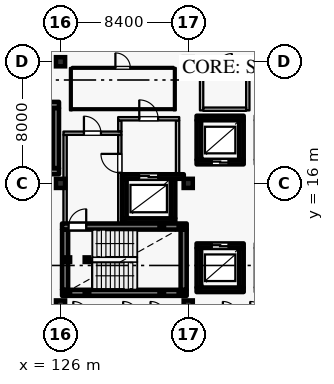
"""IFC4 building model, lengths in metres.
Left out: names, types, materials, properties, quantities, classifications, styles, units other than length and angle.
Written with IfcOpenShell. Run it as: python <this file> out.ifc"""

import sys

from ifc_helpers import new_model, si_unit, direction, frame, frame_2d, origin, origin_2d, place, context, subcontext, project, spatial, rectangle, hollow_rectangle, extrude, element, fill, save


model = new_model("IFC4")
c1 = context("Model", 3, precision=1e-05, world=origin(), true_north=direction((0.0, 1.0)))
c2 = subcontext(c1, "Body", "Model", "MODEL_VIEW")
j1 = project(units=[si_unit("LENGTHUNIT", "METRE"), si_unit("PLANEANGLEUNIT", "RADIAN")], contexts=[c1])
p1 = place(None, origin())
s1 = spatial("IfcSite", under=j1, at=p1, CompositionType="ELEMENT")
p2 = place(p1, origin())
s2 = spatial("IfcBuilding", under=s1, at=p2, CompositionType="ELEMENT")
p3 = place(p2, frame((0.0, 0.0, 39.6)))
s3 = spatial("IfcBuildingStorey", under=s2, at=p3, CompositionType="ELEMENT", Elevation=39.6)
for number, where, z_axis, x_axis in (
    (1, (126.0, 16.0, 0.0), (0.0, 0.0, 1.0), (1.0, 0.0, 0.0)),
    (2, (134.4, 16.0, 0.0), (0.0, 0.0, 1.0), (1.0, 0.0, 0.0)),
    (3, (126.0, 8.0, 0.0), (0.0, 0.0, 1.0), (1.0, 0.0, 0.0)),
    (4, (126.0, 24.0, 0.0), (0.0, 0.0, 1.0), (1.0, 0.0, 0.0)),
    (5, (134.4, 8.0, 0.0), (0.0, 0.0, 1.0), (1.0, 0.0, 0.0)),
    (6, (134.4, 24.0, 0.0), (0.0, 0.0, 1.0), (1.0, 0.0, 0.0)),
):
    element("IfcColumn", number, at=place(p3, frame(where, z_axis=z_axis, x_axis=x_axis)), inside=s3, PredefinedType="COLUMN", context=c2, shape_type="SweptSolid", body=[
        extrude(rectangle(XDim=0.6, YDim=0.6, at=origin_2d()), origin(), (0.0, 0.0, 1.0), 3.6),
    ])
p4 = place(p3, frame((134.95, 17.4, 0.0), z_axis=(0.0, 0.0, 1.0), x_axis=(1.0, 0.0, 0.0)))
e7 = element("IfcWall", 7, at=p4, inside=s3, PredefinedType="SHEAR", context=c2, shape_type="SweptSolid", body=[
    extrude(rectangle(XDim=3.1, YDim=0.3, at=frame_2d((1.55, 0.0))), origin(), (0.0, 0.0, 1.0), 3.335),
])
p5 = place(p4, frame((1.0, 0.0, 0.0)))
e8 = element("IfcOpeningElement", 8, at=p5, cuts=e7, PredefinedType="OPENING", context=c2, shape_type="SweptSolid", body=[
    extrude(rectangle(XDim=1.1, YDim=2.2, at=frame_2d((0.55, 1.1))), frame((0.0, 0.16, 0.0), z_axis=(0.0, -1.0, 0.0), x_axis=(1.0, 0.0, 0.0)), (0.0, 0.0, 1.0), 0.32),
])
p6 = place(p3, frame((137.9, 17.555, 0.0), z_axis=(0.0, 0.0, 1.0), x_axis=(0.0, 1.0, 0.0)))
e9 = element("IfcWall", 9, at=p6, inside=s3, PredefinedType="SHEAR", context=c2, shape_type="SweptSolid", body=[
    extrude(rectangle(XDim=2.59, YDim=0.3, at=frame_2d((1.295, 0.0))), origin(), (0.0, 0.0, 1.0), 3.335),
])
p7 = place(p3, frame((138.05, 20.3, 0.0), z_axis=(0.0, 0.0, 1.0), x_axis=(-1.0, 0.0, 0.0)))
e10 = element("IfcWall", 10, at=p7, inside=s3, PredefinedType="SHEAR", context=c2, shape_type="SweptSolid", body=[
    extrude(rectangle(XDim=3.1, YDim=0.3, at=frame_2d((1.55, 0.0))), origin(), (0.0, 0.0, 1.0), 3.335),
])
p8 = place(p3, frame((135.1, 20.145, 0.0), z_axis=(0.0, 0.0, 1.0), x_axis=(0.0, -1.0, 0.0)))
e11 = element("IfcWall", 11, at=p8, inside=s3, PredefinedType="SHEAR", context=c2, shape_type="SweptSolid", body=[
    extrude(rectangle(XDim=2.59, YDim=0.3, at=frame_2d((1.295, 0.0))), origin(), (0.0, 0.0, 1.0), 3.335),
])
p9 = place(p3, frame((134.95, 9.0, 0.0), z_axis=(0.0, 0.0, 1.0), x_axis=(1.0, 0.0, 0.0)))
e12 = element("IfcWall", 12, at=p9, inside=s3, PredefinedType="SHEAR", context=c2, shape_type="SweptSolid", body=[
    extrude(rectangle(XDim=3.1, YDim=0.3, at=frame_2d((1.55, 0.0))), origin(), (0.0, 0.0, 1.0), 3.335),
])
p10 = place(p3, frame((137.9, 9.155, 0.0), z_axis=(0.0, 0.0, 1.0), x_axis=(0.0, 1.0, 0.0)))
e13 = element("IfcWall", 13, at=p10, inside=s3, PredefinedType="SHEAR", context=c2, shape_type="SweptSolid", body=[
    extrude(rectangle(XDim=2.59, YDim=0.3, at=frame_2d((1.295, 0.0))), origin(), (0.0, 0.0, 1.0), 3.335),
])
p11 = place(p3, frame((138.05, 11.9, 0.0), z_axis=(0.0, 0.0, 1.0), x_axis=(-1.0, 0.0, 0.0)))
e14 = element("IfcWall", 14, at=p11, inside=s3, PredefinedType="SHEAR", context=c2, shape_type="SweptSolid", body=[
    extrude(rectangle(XDim=3.1, YDim=0.3, at=frame_2d((1.55, 0.0))), origin(), (0.0, 0.0, 1.0), 3.335),
])
p12 = place(p11, frame((1.0, 0.0, 0.0)))
e15 = element("IfcOpeningElement", 15, at=p12, cuts=e14, PredefinedType="OPENING", context=c2, shape_type="SweptSolid", body=[
    extrude(rectangle(XDim=1.1, YDim=2.2, at=frame_2d((0.55, 1.1))), frame((0.0, 0.16, 0.0), z_axis=(0.0, -1.0, 0.0), x_axis=(1.0, 0.0, 0.0)), (0.0, 0.0, 1.0), 0.32),
])
p13 = place(p3, frame((135.1, 11.745, 0.0), z_axis=(0.0, 0.0, 1.0), x_axis=(0.0, -1.0, 0.0)))
e16 = element("IfcWall", 16, at=p13, inside=s3, PredefinedType="SHEAR", context=c2, shape_type="SweptSolid", body=[
    extrude(rectangle(XDim=2.59, YDim=0.3, at=frame_2d((1.295, 0.0))), origin(), (0.0, 0.0, 1.0), 3.335),
])
p14 = place(p3, frame((130.05, 13.55, 0.0), z_axis=(0.0, 0.0, 1.0), x_axis=(1.0, 0.0, 0.0)))
e17 = element("IfcWall", 17, at=p14, inside=s3, PredefinedType="SHEAR", context=c2, shape_type="SweptSolid", body=[
    extrude(rectangle(XDim=3.5, YDim=0.3, at=frame_2d((1.75, 0.0))), origin(), (0.0, 0.0, 1.0), 3.335),
])
p15 = place(p3, frame((133.4, 13.705, 0.0), z_axis=(0.0, 0.0, 1.0), x_axis=(0.0, 1.0, 0.0)))
e18 = element("IfcWall", 18, at=p15, inside=s3, PredefinedType="SHEAR", context=c2, shape_type="SweptSolid", body=[
    extrude(rectangle(XDim=2.59, YDim=0.3, at=frame_2d((1.295, 0.0))), origin(), (0.0, 0.0, 1.0), 3.335),
])
p16 = place(p3, frame((134.11, 16.45, 0.0), z_axis=(0.0, 0.0, 1.0), x_axis=(-1.0, 0.0, 0.0)))
e19 = element("IfcWall", 19, at=p16, inside=s3, PredefinedType="SHEAR", context=c2, shape_type="SweptSolid", body=[
    extrude(rectangle(XDim=4.06, YDim=0.3, at=frame_2d((2.03, 0.0))), origin(), (0.0, 0.0, 1.0), 3.335),
])
p17 = place(p16, frame((1.685, 0.0, 0.0)))
e20 = element("IfcOpeningElement", 20, at=p17, cuts=e19, PredefinedType="OPENING", context=c2, shape_type="SweptSolid", body=[
    extrude(rectangle(XDim=1.25, YDim=2.25, at=frame_2d((0.625, 1.125))), frame((0.0, 0.16, 0.0), z_axis=(0.0, -1.0, 0.0), x_axis=(1.0, 0.0, 0.0)), (0.0, 0.0, 1.0), 0.32),
])
p18 = place(p3, frame((130.2, 16.295, 0.0), z_axis=(0.0, 0.0, 1.0), x_axis=(0.0, -1.0, 0.0)))
e21 = element("IfcWall", 21, at=p18, inside=s3, PredefinedType="SHEAR", context=c2, shape_type="SweptSolid", body=[
    extrude(rectangle(XDim=2.59, YDim=0.3, at=frame_2d((1.295, 0.0))), origin(), (0.0, 0.0, 1.0), 3.335),
])
p19 = place(p3, frame((126.1, 8.8, 0.0), z_axis=(0.0, 0.0, 1.0), x_axis=(1.0, 0.0, 0.0)))
e22 = element("IfcWall", 22, at=p19, inside=s3, PredefinedType="SHEAR", context=c2, shape_type="SweptSolid", body=[
    extrude(rectangle(XDim=8.2, YDim=0.4, at=frame_2d((4.1, 0.0))), origin(), (0.0, 0.0, 1.0), 3.335),
])
p20 = place(p3, frame((134.1, 9.005, 0.0), z_axis=(0.0, 0.0, 1.0), x_axis=(0.0, 1.0, 0.0)))
e23 = element("IfcWall", 23, at=p20, inside=s3, PredefinedType="SHEAR", context=c2, shape_type="SweptSolid", body=[
    extrude(rectangle(XDim=3.95, YDim=0.4, at=frame_2d((1.975, 0.0))), origin(), (0.0, 0.0, 1.0), 3.335),
])
p21 = place(p3, frame((126.1, 13.16, 0.0), z_axis=(0.0, 0.0, 1.0), x_axis=(1.0, 0.0, 0.0)))
e24 = element("IfcWall", 24, at=p21, inside=s3, PredefinedType="SHEAR", context=c2, shape_type="SweptSolid", body=[
    extrude(rectangle(XDim=8.2, YDim=0.4, at=frame_2d((4.1, 0.0))), origin(), (0.0, 0.0, 1.0), 3.335),
])
p22 = place(p21, frame((0.43, 0.0, 0.0)))
e25 = element("IfcOpeningElement", 25, at=p22, cuts=e24, PredefinedType="OPENING", context=c2, shape_type="SweptSolid", body=[
    extrude(rectangle(XDim=1.16, YDim=2.2, at=frame_2d((0.58, 1.1))), frame((0.0, 0.21, 0.0), z_axis=(0.0, -1.0, 0.0), x_axis=(1.0, 0.0, 0.0)), (0.0, 0.0, 1.0), 0.42),
])
p23 = place(p3, frame((126.3, 9.005, 0.0), z_axis=(0.0, 0.0, 1.0), x_axis=(0.0, 1.0, 0.0)))
e26 = element("IfcWall", 26, at=p23, inside=s3, PredefinedType="SHEAR", context=c2, shape_type="SweptSolid", body=[
    extrude(rectangle(XDim=3.95, YDim=0.4, at=frame_2d((1.975, 0.0))), origin(), (0.0, 0.0, 1.0), 3.335),
])
p24 = place(p3, frame((126.3, 13.365, 0.0), z_axis=(0.0, 0.0, 1.0), x_axis=(0.0, 1.0, 0.0)))
e27 = element("IfcWall", 27, at=p24, inside=s3, PredefinedType="PARTITIONING", context=c2, shape_type="SweptSolid", body=[
    extrude(rectangle(XDim=5.82, YDim=0.22, at=frame_2d((2.91, 0.0))), origin(), (0.0, 0.0, 1.0), 3.335),
])
p25 = place(p3, frame((126.19, 19.3, 0.0), z_axis=(0.0, 0.0, 1.0), x_axis=(1.0, 0.0, 0.0)))
e28 = element("IfcWall", 28, at=p25, inside=s3, PredefinedType="PARTITIONING", context=c2, shape_type="SweptSolid", body=[
    extrude(rectangle(XDim=3.82, YDim=0.22, at=frame_2d((1.91, 0.0))), origin(), (0.0, 0.0, 1.0), 3.335),
])
p26 = place(p25, frame((1.35, 0.0, 0.0)))
e29 = element("IfcOpeningElement", 29, at=p26, cuts=e28, PredefinedType="OPENING", context=c2, shape_type="SweptSolid", body=[
    extrude(rectangle(XDim=1.12, YDim=2.2, at=frame_2d((0.56, 1.1))), frame((0.0, 0.12, 0.0), z_axis=(0.0, -1.0, 0.0), x_axis=(1.0, 0.0, 0.0)), (0.0, 0.0, 1.0), 0.24),
])
p27 = place(p3, frame((129.9, 13.365, 0.0), z_axis=(0.0, 0.0, 1.0), x_axis=(0.0, 1.0, 0.0)))
e30 = element("IfcWall", 30, at=p27, inside=s3, PredefinedType="PARTITIONING", context=c2, shape_type="SweptSolid", body=[
    extrude(rectangle(XDim=5.82, YDim=0.22, at=frame_2d((2.91, 0.0))), origin(), (0.0, 0.0, 1.0), 3.335),
])
p28 = place(p27, frame((3.335, 0.0, 0.0)))
e31 = element("IfcOpeningElement", 31, at=p28, cuts=e30, PredefinedType="OPENING", context=c2, shape_type="SweptSolid", body=[
    extrude(rectangle(XDim=1.24, YDim=2.2, at=frame_2d((0.62, 1.1))), frame((0.0, 0.12, 0.0), z_axis=(0.0, -1.0, 0.0), x_axis=(1.0, 0.0, 0.0)), (0.0, 0.0, 1.0), 0.24),
])
p29 = place(p3, frame((129.9, 19.415, 0.0), z_axis=(0.0, 0.0, 1.0), x_axis=(0.0, 1.0, 0.0)))
e32 = element("IfcWall", 32, at=p29, inside=s3, PredefinedType="PARTITIONING", context=c2, shape_type="SweptSolid", body=[
    extrude(rectangle(XDim=0.72, YDim=0.22, at=frame_2d((0.36, 0.0))), origin(), (0.0, 0.0, 1.0), 3.335),
])
p30 = place(p3, frame((133.7, 16.605, 0.0), z_axis=(0.0, 0.0, 1.0), x_axis=(0.0, 1.0, 0.0)))
e33 = element("IfcWall", 33, at=p30, inside=s3, PredefinedType="PARTITIONING", context=c2, shape_type="SweptSolid", body=[
    extrude(rectangle(XDim=3.53, YDim=0.22, at=frame_2d((1.765, 0.0))), origin(), (0.0, 0.0, 1.0), 3.335),
])
p31 = place(p3, frame((129.79, 20.25, 0.0), z_axis=(0.0, 0.0, 1.0), x_axis=(1.0, 0.0, 0.0)))
e34 = element("IfcWall", 34, at=p31, inside=s3, PredefinedType="PARTITIONING", context=c2, shape_type="SweptSolid", body=[
    extrude(rectangle(XDim=4.02, YDim=0.22, at=frame_2d((2.01, 0.0))), origin(), (0.0, 0.0, 1.0), 3.335),
])
p32 = place(p31, frame((1.39, 0.0, 0.0)))
e35 = element("IfcOpeningElement", 35, at=p32, cuts=e34, PredefinedType="OPENING", context=c2, shape_type="SweptSolid", body=[
    extrude(rectangle(XDim=1.24, YDim=2.2, at=frame_2d((0.62, 1.1))), frame((0.0, 0.12, 0.0), z_axis=(0.0, -1.0, 0.0), x_axis=(1.0, 0.0, 0.0)), (0.0, 0.0, 1.0), 0.24),
])
for number, where, z_axis, x_axis in (
    (36, (126.48, 8.8, 0.0), (0.0, 0.0, 1.0), (1.0, 0.0, 0.0)),
    (37, (126.48, 10.98, 0.0), (0.0, 0.0, 1.0), (1.0, 0.0, 0.0)),
    (38, (127.74, 8.8, 0.0), (0.0, 0.0, 1.0), (1.0, 0.0, 0.0)),
    (39, (127.74, 10.98, 0.0), (0.0, 0.0, 1.0), (1.0, 0.0, 0.0)),
    (40, (132.66, 8.8, -1.8), (0.0, 0.0, 1.0), (1.0, 0.0, 0.0)),
    (41, (132.66, 13.16, -1.8), (0.0, 0.0, 1.0), (1.0, 0.0, 0.0)),
    (42, (133.92, 8.8, -1.8), (0.0, 0.0, 1.0), (1.0, 0.0, 0.0)),
    (43, (133.92, 13.16, -1.8), (0.0, 0.0, 1.0), (1.0, 0.0, 0.0)),
):
    element("IfcColumn", number, at=place(p3, frame(where, z_axis=z_axis, x_axis=x_axis)), inside=s3, PredefinedType="COLUMN", context=c2, shape_type="SweptSolid", body=[
        extrude(hollow_rectangle(XDim=0.3, YDim=0.3, WallThickness=0.012, at=origin_2d()), origin(), (0.0, 0.0, 1.0), 3.42),
    ])
p33 = place(p3, frame((117.75, 16.8, 0.0), z_axis=(0.0, 0.0, 1.0), x_axis=(1.0, 0.0, 0.0)))
e44 = element("IfcWall", 44, at=p33, inside=s3, PredefinedType="SHEAR", context=c2, shape_type="SweptSolid", body=[
    extrude(rectangle(XDim=8.15, YDim=0.4, at=frame_2d((4.075, 0.0))), origin(), (0.0, 0.0, 1.0), 3.335),
])
p34 = place(p3, frame((125.7, 17.005, 0.0), z_axis=(0.0, 0.0, 1.0), x_axis=(0.0, 1.0, 0.0)))
e45 = element("IfcWall", 45, at=p34, inside=s3, PredefinedType="SHEAR", context=c2, shape_type="SweptSolid", body=[
    extrude(rectangle(XDim=3.95, YDim=0.4, at=frame_2d((1.975, 0.0))), origin(), (0.0, 0.0, 1.0), 3.335),
])
p35 = place(p3, frame((117.75, 21.16, 0.0), z_axis=(0.0, 0.0, 1.0), x_axis=(1.0, 0.0, 0.0)))
e46 = element("IfcWall", 46, at=p35, inside=s3, PredefinedType="SHEAR", context=c2, shape_type="SweptSolid", body=[
    extrude(rectangle(XDim=8.15, YDim=0.4, at=frame_2d((4.075, 0.0))), origin(), (0.0, 0.0, 1.0), 3.335),
])
p36 = place(p35, frame((0.38, 0.0, 0.0)))
e47 = element("IfcOpeningElement", 47, at=p36, cuts=e46, PredefinedType="OPENING", context=c2, shape_type="SweptSolid", body=[
    extrude(rectangle(XDim=1.16, YDim=2.2, at=frame_2d((0.58, 1.1))), frame((0.0, 0.21, 0.0), z_axis=(0.0, -1.0, 0.0), x_axis=(1.0, 0.0, 0.0)), (0.0, 0.0, 1.0), 0.42),
])
p37 = place(p3, frame((135.36, 23.6, 0.0), z_axis=(0.0, 0.0, 1.0), x_axis=(1.0, 0.0, 0.0)))
e48 = element("IfcWall", 48, at=p37, inside=s3, PredefinedType="PARTITIONING", context=c2, shape_type="SweptSolid", body=[
    extrude(rectangle(XDim=2.88, YDim=0.22, at=frame_2d((1.44, 0.0))), origin(), (0.0, 0.0, 1.0), 3.335),
])
p38 = place(p37, frame((0.97, 0.0, 0.0)))
e49 = element("IfcOpeningElement", 49, at=p38, cuts=e48, PredefinedType="OPENING", context=c2, shape_type="SweptSolid", body=[
    extrude(rectangle(XDim=0.94, YDim=2.15, at=frame_2d((0.47, 1.075))), frame((0.0, 0.12, 0.0), z_axis=(0.0, -1.0, 0.0), x_axis=(1.0, 0.0, 0.0)), (0.0, 0.0, 1.0), 0.24),
])
p39 = place(p3, frame((126.76, 23.6, 0.0), z_axis=(0.0, 0.0, 1.0), x_axis=(1.0, 0.0, 0.0)))
e50 = element("IfcWall", 50, at=p39, inside=s3, PredefinedType="PARTITIONING", context=c2, shape_type="SweptSolid", body=[
    extrude(rectangle(XDim=6.68, YDim=0.125, at=frame_2d((3.34, 0.0))), origin(), (0.0, 0.0, 1.0), 3.335),
])
p40 = place(p39, frame((2.85, 0.0, 0.0)))
e51 = element("IfcOpeningElement", 51, at=p40, cuts=e50, PredefinedType="OPENING", context=c2, shape_type="SweptSolid", body=[
    extrude(rectangle(XDim=0.98, YDim=2.15, at=frame_2d((0.49, 1.075))), frame((0.0, 0.073, 0.0), z_axis=(0.0, -1.0, 0.0), x_axis=(1.0, 0.0, 0.0)), (0.0, 0.0, 1.0), 0.145),
])
for number, where, z_axis, x_axis in (
    (52, (135.28, 20.8, 0.0), (0.0, 0.0, 1.0), (0.0, 1.0, 0.0)),
    (53, (138.32, 20.8, 0.0), (0.0, 0.0, 1.0), (0.0, 1.0, 0.0)),
):
    element("IfcWall", number, at=place(p3, frame(where, z_axis=z_axis, x_axis=x_axis)), inside=s3, PredefinedType="PARTITIONING", context=c2, shape_type="SweptSolid", body=[
        extrude(rectangle(XDim=2.748, YDim=0.22, at=frame_2d((1.374, 0.0))), origin(), (0.0, 0.0, 1.0), 3.335),
    ])
p41 = place(p3, frame((135.39, 20.88, 0.0), z_axis=(0.0, 0.0, 1.0), x_axis=(1.0, 0.0, 0.0)))
e54 = element("IfcWall", 54, at=p41, inside=s3, PredefinedType="PARTITIONING", context=c2, shape_type="SweptSolid", body=[
    extrude(rectangle(XDim=2.82, YDim=0.22, at=frame_2d((1.41, 0.0))), origin(), (0.0, 0.0, 1.0), 3.335),
])
for number, where, z_axis, x_axis in (
    (55, (126.68, 20.8, 0.0), (0.0, 0.0, 1.0), (0.0, 1.0, 0.0)),
    (56, (133.52, 20.8, 0.0), (0.0, 0.0, 1.0), (0.0, 1.0, 0.0)),
):
    element("IfcWall", number, at=place(p3, frame(where, z_axis=z_axis, x_axis=x_axis)), inside=s3, PredefinedType="PARTITIONING", context=c2, shape_type="SweptSolid", body=[
        extrude(rectangle(XDim=2.796, YDim=0.125, at=frame_2d((1.398, 0.0))), origin(), (0.0, 0.0, 1.0), 3.335),
    ])
p42 = place(p3, frame((126.742, 20.88, 0.0), z_axis=(0.0, 0.0, 1.0), x_axis=(1.0, 0.0, 0.0)))
e57 = element("IfcWall", 57, at=p42, inside=s3, PredefinedType="PARTITIONING", context=c2, shape_type="SweptSolid", body=[
    extrude(rectangle(XDim=6.715, YDim=0.125, at=frame_2d((3.357, 0.0))), origin(), (0.0, 0.0, 1.0), 3.335),
])
p43 = place(p5, origin())
e58 = element("IfcDoor", 58, at=p43, inside=s3, OperationType="DOUBLE_DOOR_SLIDING", PredefinedType="DOOR", context=c2, shape_type="SweptSolid", body=[
    extrude(rectangle(XDim=1.1, YDim=2.2, at=frame_2d((0.55, 1.1))), frame((0.0, 0.025, 0.0), z_axis=(0.0, -1.0, 0.0), x_axis=(1.0, 0.0, 0.0)), (0.0, 0.0, 1.0), 0.05),
])
fill(e8, e58)
p44 = place(p12, origin())
e59 = element("IfcDoor", 59, at=p44, inside=s3, OperationType="DOUBLE_DOOR_SLIDING", PredefinedType="DOOR", context=c2, shape_type="SweptSolid", body=[
    extrude(rectangle(XDim=1.1, YDim=2.2, at=frame_2d((0.55, 1.1))), frame((0.0, 0.025, 0.0), z_axis=(0.0, -1.0, 0.0), x_axis=(1.0, 0.0, 0.0)), (0.0, 0.0, 1.0), 0.05),
])
fill(e15, e59)
p45 = place(p17, origin())
e60 = element("IfcDoor", 60, at=p45, inside=s3, OperationType="DOUBLE_DOOR_SLIDING", PredefinedType="DOOR", context=c2, shape_type="SweptSolid", body=[
    extrude(rectangle(XDim=1.25, YDim=2.25, at=frame_2d((0.625, 1.125))), frame((0.0, 0.025, 0.0), z_axis=(0.0, -1.0, 0.0), x_axis=(1.0, 0.0, 0.0)), (0.0, 0.0, 1.0), 0.05),
])
fill(e20, e60)
p46 = place(p22, origin())
e61 = element("IfcDoor", 61, at=p46, inside=s3, OperationType="SINGLE_SWING_RIGHT", PredefinedType="DOOR", context=c2, shape_type="SweptSolid", body=[
    extrude(rectangle(XDim=1.16, YDim=2.2, at=frame_2d((0.58, 1.1))), frame((0.0, 0.025, 0.0), z_axis=(0.0, -1.0, 0.0), x_axis=(1.0, 0.0, 0.0)), (0.0, 0.0, 1.0), 0.05),
])
fill(e25, e61)
p47 = place(p26, origin())
e62 = element("IfcDoor", 62, at=p47, inside=s3, OperationType="SINGLE_SWING_LEFT", PredefinedType="DOOR", context=c2, shape_type="SweptSolid", body=[
    extrude(rectangle(XDim=1.12, YDim=2.2, at=frame_2d((0.56, 1.1))), frame((0.0, 0.025, 0.0), z_axis=(0.0, -1.0, 0.0), x_axis=(1.0, 0.0, 0.0)), (0.0, 0.0, 1.0), 0.05),
])
fill(e29, e62)
p48 = place(p28, origin())
e63 = element("IfcDoor", 63, at=p48, inside=s3, OperationType="SINGLE_SWING_RIGHT", PredefinedType="DOOR", context=c2, shape_type="SweptSolid", body=[
    extrude(rectangle(XDim=1.24, YDim=2.2, at=frame_2d((0.62, 1.1))), frame((0.0, 0.025, 0.0), z_axis=(0.0, -1.0, 0.0), x_axis=(1.0, 0.0, 0.0)), (0.0, 0.0, 1.0), 0.05),
])
fill(e31, e63)
p49 = place(p32, origin())
e64 = element("IfcDoor", 64, at=p49, inside=s3, OperationType="SINGLE_SWING_LEFT", PredefinedType="DOOR", context=c2, shape_type="SweptSolid", body=[
    extrude(rectangle(XDim=1.24, YDim=2.2, at=frame_2d((0.62, 1.1))), frame((0.0, 0.025, 0.0), z_axis=(0.0, -1.0, 0.0), x_axis=(1.0, 0.0, 0.0)), (0.0, 0.0, 1.0), 0.05),
])
fill(e35, e64)
p50 = place(p38, origin())
e65 = element("IfcDoor", 65, at=p50, inside=s3, OperationType="SINGLE_SWING_RIGHT", PredefinedType="DOOR", context=c2, shape_type="SweptSolid", body=[
    extrude(rectangle(XDim=0.94, YDim=2.15, at=frame_2d((0.47, 1.075))), frame((0.0, 0.025, 0.0), z_axis=(0.0, -1.0, 0.0), x_axis=(1.0, 0.0, 0.0)), (0.0, 0.0, 1.0), 0.05),
])
fill(e49, e65)
p51 = place(p40, origin())
e66 = element("IfcDoor", 66, at=p51, inside=s3, OperationType="SINGLE_SWING_LEFT", PredefinedType="DOOR", context=c2, shape_type="SweptSolid", body=[
    extrude(rectangle(XDim=0.98, YDim=2.15, at=frame_2d((0.49, 1.075))), frame((0.0, 0.025, 0.0), z_axis=(0.0, -1.0, 0.0), x_axis=(1.0, 0.0, 0.0)), (0.0, 0.0, 1.0), 0.05),
])
fill(e51, e66)
save(model, sys.argv[1])
